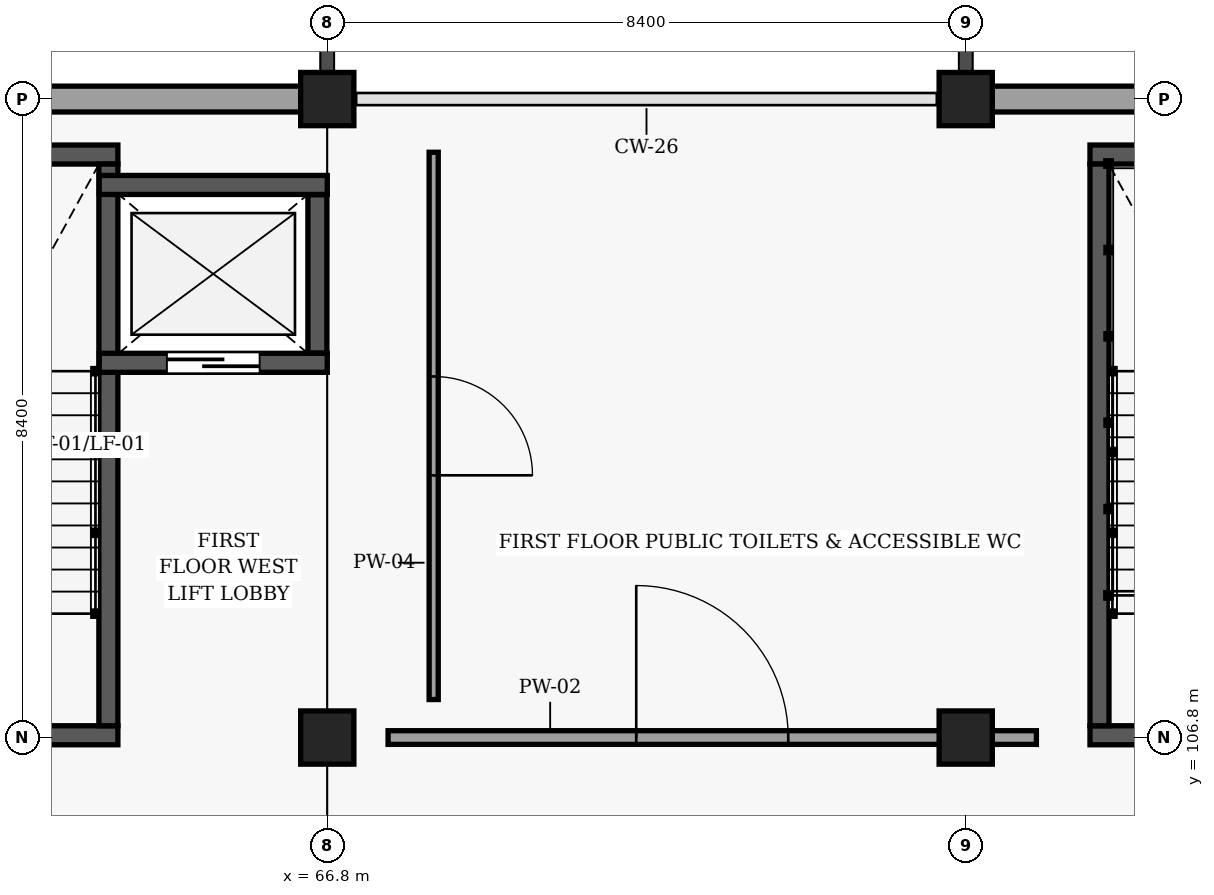
"""IFC4 building model, lengths in metres.
Left out: names, types, materials, properties, quantities, classifications, styles, units other than length and angle.
Written with IfcOpenShell. Run it as: python <this file> out.ifc"""

import sys

from ifc_helpers import new_model, si_unit, direction, frame, frame_2d, origin, origin_2d, place, context, subcontext, project, spatial, rectangle, extrude, element, fill, save


model = new_model("IFC4")
c1 = context("Model", 3, precision=1e-05, world=origin(), true_north=direction((0.0, 1.0)))
c2 = subcontext(c1, "Body", "Model", "MODEL_VIEW")
j1 = project(units=[si_unit("LENGTHUNIT", "METRE"), si_unit("PLANEANGLEUNIT", "RADIAN")], contexts=[c1])
p1 = place(None, origin())
s1 = spatial("IfcSite", under=j1, at=p1, CompositionType="ELEMENT")
p2 = place(p1, origin())
s2 = spatial("IfcBuilding", under=s1, at=p2, CompositionType="ELEMENT")
p3 = place(p2, frame((0.0, 0.0, 4.8)))
s3 = spatial("IfcBuildingStorey", under=s2, at=p3, CompositionType="ELEMENT", Elevation=4.8)
for number, where, z_axis, x_axis in (
    (1, (66.8, 106.8, 0.0), (0.0, 0.0, 1.0), (1.0, 0.0, 0.0)),
    (2, (66.8, 115.2, 0.0), (0.0, 0.0, 1.0), (1.0, 0.0, 0.0)),
    (3, (75.2, 106.8, 0.0), (0.0, 0.0, 1.0), (1.0, 0.0, 0.0)),
    (4, (75.2, 115.2, 0.0), (0.0, 0.0, 1.0), (1.0, 0.0, 0.0)),
):
    element("IfcColumn", number, at=place(p3, frame(where, z_axis=z_axis, x_axis=x_axis)), inside=s3, PredefinedType="COLUMN", context=c2, shape_type="SweptSolid", body=[
        extrude(rectangle(XDim=0.7, YDim=0.7, at=origin_2d()), origin(), (0.0, 0.0, 1.0), 4.2),
    ])
p4 = place(p3, frame((58.5, 115.2, 0.0), z_axis=(0.0, 0.0, 1.0), x_axis=(1.0, 0.0, 0.0)))
e5 = element("IfcWall", 5, at=p4, inside=s3, PredefinedType="SOLIDWALL", context=c2, shape_type="SweptSolid", body=[
    extrude(rectangle(XDim=8.2, YDim=0.34, at=frame_2d((4.1, 0.0))), origin(), (0.0, 0.0, 1.0), 3.145),
])
p5 = place(p3, frame((75.3, 115.2, 0.0), z_axis=(0.0, 0.0, 1.0), x_axis=(1.0, 0.0, 0.0)))
e6 = element("IfcWall", 6, at=p5, inside=s3, PredefinedType="SOLIDWALL", context=c2, shape_type="SweptSolid", body=[
    extrude(rectangle(XDim=8.6, YDim=0.34, at=frame_2d((4.3, 0.0))), origin(), (0.0, 0.0, 1.0), 3.145),
])
p6 = place(p3, frame((64.045, 106.83, 0.0), z_axis=(0.0, 0.0, 1.0), x_axis=(-1.0, 0.0, 0.0)))
e7 = element("IfcWall", 7, at=p6, inside=s3, PredefinedType="SHEAR", context=c2, shape_type="SweptSolid", body=[
    extrude(rectangle(XDim=3.61, YDim=0.25, at=frame_2d((1.805, 0.0))), origin(), (0.0, 0.0, 1.0), 3.96),
])
p7 = place(p6, frame((1.205, 0.0, 0.0)))
e8 = element("IfcOpeningElement", 8, at=p7, cuts=e7, PredefinedType="OPENING", context=c2, shape_type="SweptSolid", body=[
    extrude(rectangle(XDim=1.2, YDim=2.15, at=frame_2d((0.6, 1.075))), frame((0.0, 0.135, 0.0), z_axis=(0.0, -1.0, 0.0), x_axis=(1.0, 0.0, 0.0)), (0.0, 0.0, 1.0), 0.27),
])
p8 = place(p3, frame((60.435, 114.47, 0.0), z_axis=(0.0, 0.0, 1.0), x_axis=(1.0, 0.0, 0.0)))
e9 = element("IfcWall", 9, at=p8, inside=s3, PredefinedType="SHEAR", context=c2, shape_type="SweptSolid", body=[
    extrude(rectangle(XDim=3.61, YDim=0.25, at=frame_2d((1.805, 0.0))), origin(), (0.0, 0.0, 1.0), 3.96),
])
p9 = place(p3, frame((63.92, 114.345, 0.0), z_axis=(0.0, 0.0, 1.0), x_axis=(0.0, -1.0, 0.0)))
e10 = element("IfcWall", 10, at=p9, inside=s3, PredefinedType="SHEAR", context=c2, shape_type="SweptSolid", body=[
    extrude(rectangle(XDim=7.39, YDim=0.25, at=frame_2d((3.695, 0.0))), origin(), (0.0, 0.0, 1.0), 3.96),
])
p10 = place(p3, frame((63.8, 111.73, 0.0), z_axis=(0.0, 0.0, 1.0), x_axis=(1.0, 0.0, 0.0)))
e11 = element("IfcWall", 11, at=p10, inside=s3, PredefinedType="SHEAR", context=c2, shape_type="SweptSolid", body=[
    extrude(rectangle(XDim=3.0, YDim=0.25, at=frame_2d((1.5, 0.0))), origin(), (0.0, 0.0, 1.0), 3.96),
])
p11 = place(p10, frame((0.89, 0.0, 0.0)))
e12 = element("IfcOpeningElement", 12, at=p11, cuts=e11, PredefinedType="OPENING", context=c2, shape_type="SweptSolid", body=[
    extrude(rectangle(XDim=1.22, YDim=2.18, at=frame_2d((0.61, 1.09))), frame((0.0, 0.135, 0.0), z_axis=(0.0, -1.0, 0.0), x_axis=(1.0, 0.0, 0.0)), (0.0, 0.0, 1.0), 0.27),
])
p12 = place(p3, frame((66.8, 114.07, 0.0), z_axis=(0.0, 0.0, 1.0), x_axis=(-1.0, 0.0, 0.0)))
e13 = element("IfcWall", 13, at=p12, inside=s3, PredefinedType="SHEAR", context=c2, shape_type="SweptSolid", body=[
    extrude(rectangle(XDim=3.0, YDim=0.25, at=frame_2d((1.5, 0.0))), origin(), (0.0, 0.0, 1.0), 3.96),
])
p13 = place(p3, frame((66.67, 111.86, 0.0), z_axis=(0.0, 0.0, 1.0), x_axis=(0.0, 1.0, 0.0)))
e14 = element("IfcWall", 14, at=p13, inside=s3, PredefinedType="SHEAR", context=c2, shape_type="SweptSolid", body=[
    extrude(rectangle(XDim=2.08, YDim=0.25, at=frame_2d((1.04, 0.0))), origin(), (0.0, 0.0, 1.0), 3.96),
])
p14 = place(p3, frame((80.445, 106.83, 0.0), z_axis=(0.0, 0.0, 1.0), x_axis=(-1.0, 0.0, 0.0)))
e15 = element("IfcWall", 15, at=p14, inside=s3, PredefinedType="SHEAR", context=c2, shape_type="SweptSolid", body=[
    extrude(rectangle(XDim=3.61, YDim=0.25, at=frame_2d((1.805, 0.0))), origin(), (0.0, 0.0, 1.0), 3.96),
])
p15 = place(p14, frame((1.235, 0.0, 0.0)))
e16 = element("IfcOpeningElement", 16, at=p15, cuts=e15, PredefinedType="OPENING", context=c2, shape_type="SweptSolid", body=[
    extrude(rectangle(XDim=1.14, YDim=2.15, at=frame_2d((0.57, 1.075))), frame((0.0, 0.135, 0.0), z_axis=(0.0, -1.0, 0.0), x_axis=(1.0, 0.0, 0.0)), (0.0, 0.0, 1.0), 0.27),
])
p16 = place(p3, frame((76.835, 114.47, 0.0), z_axis=(0.0, 0.0, 1.0), x_axis=(1.0, 0.0, 0.0)))
e17 = element("IfcWall", 17, at=p16, inside=s3, PredefinedType="SHEAR", context=c2, shape_type="SweptSolid", body=[
    extrude(rectangle(XDim=3.61, YDim=0.25, at=frame_2d((1.805, 0.0))), origin(), (0.0, 0.0, 1.0), 3.96),
])
p17 = place(p3, frame((76.96, 106.955, 0.0), z_axis=(0.0, 0.0, 1.0), x_axis=(0.0, 1.0, 0.0)))
e18 = element("IfcWall", 18, at=p17, inside=s3, PredefinedType="SHEAR", context=c2, shape_type="SweptSolid", body=[
    extrude(rectangle(XDim=7.39, YDim=0.25, at=frame_2d((3.695, 0.0))), origin(), (0.0, 0.0, 1.0), 3.96),
])
p18 = place(p3, frame((67.6, 106.8, 0.0), z_axis=(0.0, 0.0, 1.0), x_axis=(1.0, 0.0, 0.0)))
e19 = element("IfcWall", 19, at=p18, inside=s3, PredefinedType="PARTITIONING", context=c2, shape_type="SweptSolid", body=[
    extrude(rectangle(XDim=8.53, YDim=0.18, at=frame_2d((4.265, 0.0))), origin(), (0.0, 0.0, 1.0), 3.145),
])
p19 = place(p18, frame((3.265, 0.0, 0.0)))
e20 = element("IfcOpeningElement", 20, at=p19, cuts=e19, PredefinedType="OPENING", context=c2, shape_type="SweptSolid", body=[
    extrude(rectangle(XDim=2.0, YDim=2.3, at=frame_2d((1.0, 1.15))), frame((0.0, 0.1, 0.0), z_axis=(0.0, -1.0, 0.0), x_axis=(1.0, 0.0, 0.0)), (0.0, 0.0, 1.0), 0.2),
])
p20 = place(p3, frame((68.2, 107.3, 0.0), z_axis=(0.0, 0.0, 1.0), x_axis=(0.0, 1.0, 0.0)))
e21 = element("IfcWall", 21, at=p20, inside=s3, PredefinedType="PARTITIONING", context=c2, shape_type="SweptSolid", body=[
    extrude(rectangle(XDim=7.2, YDim=0.12, at=frame_2d((3.6, 0.0))), origin(), (0.0, 0.0, 1.0), 3.945),
])
p21 = place(p20, frame((2.95, 0.0, 0.0)))
e22 = element("IfcOpeningElement", 22, at=p21, cuts=e21, PredefinedType="OPENING", context=c2, shape_type="SweptSolid", body=[
    extrude(rectangle(XDim=1.3, YDim=2.2, at=frame_2d((0.65, 1.1))), frame((0.0, 0.07, 0.0), z_axis=(0.0, -1.0, 0.0), x_axis=(1.0, 0.0, 0.0)), (0.0, 0.0, 1.0), 0.14),
])
p22 = place(p11, origin())
e23 = element("IfcDoor", 23, at=p22, inside=s3, OperationType="SLIDING_TO_RIGHT", PredefinedType="DOOR", context=c2, shape_type="SweptSolid", body=[
    extrude(rectangle(XDim=1.22, YDim=2.18, at=frame_2d((0.61, 1.09))), frame((0.0, 0.025, 0.0), z_axis=(0.0, -1.0, 0.0), x_axis=(1.0, 0.0, 0.0)), (0.0, 0.0, 1.0), 0.05),
])
fill(e12, e23)
p23 = place(p19, origin())
e24 = element("IfcDoor", 24, at=p23, inside=s3, OperationType="DOUBLE_DOOR_SINGLE_SWING", PredefinedType="DOOR", context=c2, shape_type="SweptSolid", body=[
    extrude(rectangle(XDim=2.0, YDim=2.3, at=frame_2d((1.0, 1.15))), frame((0.0, 0.025, 0.0), z_axis=(0.0, -1.0, 0.0), x_axis=(1.0, 0.0, 0.0)), (0.0, 0.0, 1.0), 0.05),
])
fill(e20, e24)
p24 = place(p21, origin())
e25 = element("IfcDoor", 25, at=p24, inside=s3, OperationType="SINGLE_SWING_RIGHT", PredefinedType="DOOR", context=c2, shape_type="SweptSolid", body=[
    extrude(rectangle(XDim=1.3, YDim=2.2, at=frame_2d((0.65, 1.1))), frame((0.0, 0.025, 0.0), z_axis=(0.0, -1.0, 0.0), x_axis=(1.0, 0.0, 0.0)), (0.0, 0.0, 1.0), 0.05),
])
fill(e22, e25)
save(model, sys.argv[1])
